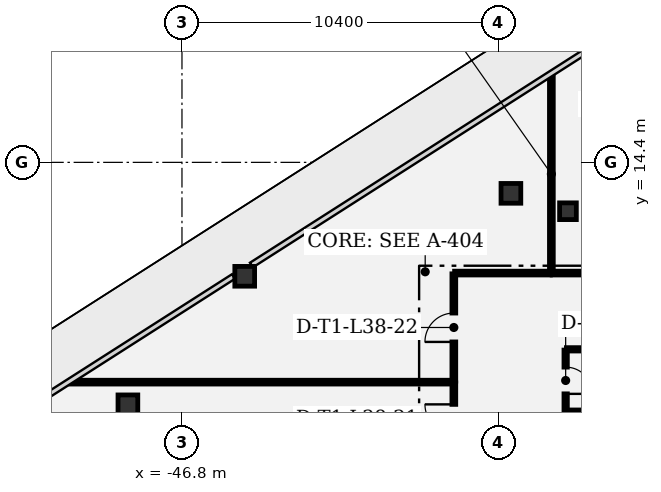
"""IFC4 building model, lengths in metres.
Left out: names, types, materials, properties, quantities, classifications, styles, units other than length and angle.
Written with IfcOpenShell. Run it as: python <this file> out.ifc"""

import sys

from ifc_helpers import new_model, si_unit, direction, frame, frame_2d, origin, origin_2d, place, context, subcontext, project, spatial, rectangle, extrude, element, fill, save


model = new_model("IFC4")
c1 = context("Model", 3, precision=1e-05, world=origin(), true_north=direction((0.0, 1.0)))
c2 = subcontext(c1, "Body", "Model", "MODEL_VIEW")
j1 = project(units=[si_unit("LENGTHUNIT", "METRE"), si_unit("PLANEANGLEUNIT", "RADIAN")], contexts=[c1])
p1 = place(None, origin())
s1 = spatial("IfcSite", under=j1, at=p1, CompositionType="ELEMENT")
p2 = place(p1, origin())
s2 = spatial("IfcBuilding", under=s1, at=p2, CompositionType="ELEMENT")
p3 = place(p2, frame((0.0, 0.0, 166.5)))
s3 = spatial("IfcBuildingStorey", under=s2, at=p3, CompositionType="ELEMENT", Elevation=166.5)
for number, where, z_axis, x_axis in (
    (1, (-44.736, 10.652, 0.0), (0.0, 0.0, 1.0), (1.0, 0.0, 0.0)),
    (2, (-48.578, 6.425, 0.0), (0.0, 0.0, 1.0), (1.0, 0.0, 0.0)),
    (3, (-35.981, 13.381, 0.0), (0.0, 0.0, 1.0), (1.0, 0.0, 0.0)),
):
    element("IfcColumn", number, at=place(p3, frame(where, z_axis=z_axis, x_axis=x_axis)), inside=s3, PredefinedType="COLUMN", context=c2, shape_type="SweptSolid", body=[
        extrude(rectangle(XDim=0.65, YDim=0.65, at=origin_2d()), origin(), (0.0, 0.0, 1.0), 4.05),
    ])
p4 = place(p3, frame((-34.104, 12.792, 0.0), z_axis=(0.0, 0.0, 1.0), x_axis=(1.0, 0.0, 0.0)))
e4 = element("IfcColumn", 4, at=p4, inside=s3, PredefinedType="COLUMN", context=c2, shape_type="SweptSolid", body=[
    extrude(rectangle(XDim=0.55, YDim=0.55, at=origin_2d()), origin(), (0.0, 0.0, 1.0), 4.05),
])
p5 = place(p3, frame((-34.18, 8.225, 0.0), z_axis=(0.0, 0.0, 1.0), x_axis=(0.0, -1.0, 0.0)))
e5 = element("IfcWall", 5, at=p5, inside=s3, PredefinedType="PARTITIONING", context=c2, shape_type="SweptSolid", body=[
    extrude(rectangle(XDim=2.0, YDim=0.11, at=frame_2d((1.0, 0.0))), origin(), (0.0, 0.0, 1.0), 3.78),
])
p6 = place(p5, frame((0.56, 0.0, 0.0)))
e6 = element("IfcOpeningElement", 6, at=p6, cuts=e5, PredefinedType="OPENING", context=c2, shape_type="SweptSolid", body=[
    extrude(rectangle(XDim=0.88, YDim=2.1, at=frame_2d((0.44, 1.05))), frame((0.0, 0.065, 0.0), z_axis=(0.0, -1.0, 0.0), x_axis=(1.0, 0.0, 0.0)), (0.0, 0.0, 1.0), 0.13),
])
p7 = place(p3, frame((-34.155, 6.2, 0.0), z_axis=(0.0, 0.0, 1.0), x_axis=(1.0, 0.0, 0.0)))
e7 = element("IfcWall", 7, at=p7, inside=s3, PredefinedType="PARTITIONING", context=c2, shape_type="SweptSolid", body=[
    extrude(rectangle(XDim=3.25, YDim=0.11, at=frame_2d((1.625, 0.0))), origin(), (0.0, 0.0, 1.0), 3.344),
])
p8 = place(p3, frame((-30.905, 8.25, 0.0), z_axis=(0.0, 0.0, 1.0), x_axis=(-1.0, 0.0, 0.0)))
e8 = element("IfcWall", 8, at=p8, inside=s3, PredefinedType="PARTITIONING", context=c2, shape_type="SweptSolid", body=[
    extrude(rectangle(XDim=3.25, YDim=0.11, at=frame_2d((1.625, 0.0))), origin(), (0.0, 0.0, 1.0), 3.78),
])
p9 = place(p3, frame((-34.65, 17.248, 0.0), z_axis=(0.0, 0.0, 1.0), x_axis=(0.0, -1.0, 0.0)))
e9 = element("IfcWall", 9, at=p9, inside=s3, PredefinedType="PARTITIONING", context=c2, shape_type="SweptSolid", body=[
    extrude(rectangle(XDim=6.465, YDim=0.125, at=frame_2d((3.232, 0.0))), origin(), (0.0, 0.0, 1.0), 3.78),
])
p10 = place(p3, frame((-34.625, 10.758, 0.0), z_axis=(0.0, 0.0, 1.0), x_axis=(1.0, 0.0, 0.0)))
e10 = element("IfcWall", 10, at=p10, inside=s3, PredefinedType="PARTITIONING", context=c2, shape_type="SweptSolid", body=[
    extrude(rectangle(XDim=4.621, YDim=0.125, at=frame_2d((2.311, 0.0))), origin(), (0.0, 0.0, 1.0), 3.344),
])
p11 = place(p10, frame((1.835, 0.0, 0.0)))
e11 = element("IfcOpeningElement", 11, at=p11, cuts=e10, PredefinedType="OPENING", context=c2, shape_type="SweptSolid", body=[
    extrude(rectangle(XDim=0.95, YDim=2.15, at=frame_2d((0.475, 1.075))), frame((0.0, 0.073, 0.0), z_axis=(0.0, -1.0, 0.0), x_axis=(1.0, 0.0, 0.0)), (0.0, 0.0, 1.0), 0.145),
])
p12 = place(p3, frame((-37.858, 4.783, 0.0), z_axis=(0.0, 0.0, 1.0), x_axis=(0.0, 1.0, 0.0)))
e12 = element("IfcWall", 12, at=p12, inside=s3, PredefinedType="PARTITIONING", context=c2, shape_type="SweptSolid", body=[
    extrude(rectangle(XDim=2.362, YDim=0.125, at=frame_2d((1.181, 0.0))), origin(), (0.0, 0.0, 1.0), 3.78),
])
p13 = place(p12, frame((0.706, 0.0, 0.0)))
e13 = element("IfcOpeningElement", 13, at=p13, cuts=e12, PredefinedType="OPENING", context=c2, shape_type="SweptSolid", body=[
    extrude(rectangle(XDim=0.95, YDim=2.15, at=frame_2d((0.475, 1.075))), frame((0.0, 0.073, 0.0), z_axis=(0.0, -1.0, 0.0), x_axis=(1.0, 0.0, 0.0)), (0.0, 0.0, 1.0), 0.145),
])
p14 = place(p3, frame((-37.883, 7.17, 0.0), z_axis=(0.0, 0.0, 1.0), x_axis=(-1.0, 0.0, 0.0)))
e14 = element("IfcWall", 14, at=p14, inside=s3, PredefinedType="PARTITIONING", context=c2, shape_type="SweptSolid", body=[
    extrude(rectangle(XDim=12.58, YDim=0.125, at=frame_2d((6.29, 0.0))), origin(), (0.0, 0.0, 1.0), 2.9),
])
p15 = place(p3, frame((-37.858, 7.204, 0.0), z_axis=(0.0, 0.0, 1.0), x_axis=(0.0, 1.0, 0.0)))
e15 = element("IfcWall", 15, at=p15, inside=s3, PredefinedType="PARTITIONING", context=c2, shape_type="SweptSolid", body=[
    extrude(rectangle(XDim=3.53, YDim=0.125, at=frame_2d((1.765, 0.0))), origin(), (0.0, 0.0, 1.0), 3.78),
])
p16 = place(p15, frame((1.29, 0.0, 0.0)))
e16 = element("IfcOpeningElement", 16, at=p16, cuts=e15, PredefinedType="OPENING", context=c2, shape_type="SweptSolid", body=[
    extrude(rectangle(XDim=0.95, YDim=2.15, at=frame_2d((0.475, 1.075))), frame((0.0, 0.073, 0.0), z_axis=(0.0, -1.0, 0.0), x_axis=(1.0, 0.0, 0.0)), (0.0, 0.0, 1.0), 0.145),
])
p17 = place(p3, frame((-34.683, 10.758, 0.0), z_axis=(0.0, 0.0, 1.0), x_axis=(-1.0, 0.0, 0.0)))
e17 = element("IfcWall", 17, at=p17, inside=s3, PredefinedType="PARTITIONING", context=c2, shape_type="SweptSolid", body=[
    extrude(rectangle(XDim=3.15, YDim=0.125, at=frame_2d((1.575, 0.0))), origin(), (0.0, 0.0, 1.0), 3.344),
])
p18 = place(p6, origin())
e18 = element("IfcDoor", 18, at=p18, inside=s3, OperationType="SINGLE_SWING_RIGHT", PredefinedType="DOOR", context=c2, shape_type="SweptSolid", body=[
    extrude(rectangle(XDim=0.88, YDim=2.1, at=frame_2d((0.44, 1.05))), frame((0.0, 0.025, 0.0), z_axis=(0.0, -1.0, 0.0), x_axis=(1.0, 0.0, 0.0)), (0.0, 0.0, 1.0), 0.05),
])
fill(e6, e18)
p19 = place(p13, origin())
e19 = element("IfcDoor", 19, at=p19, inside=s3, OperationType="SINGLE_SWING_RIGHT", PredefinedType="DOOR", context=c2, shape_type="SweptSolid", body=[
    extrude(rectangle(XDim=0.95, YDim=2.15, at=frame_2d((0.475, 1.075))), frame((0.0, 0.025, 0.0), z_axis=(0.0, -1.0, 0.0), x_axis=(1.0, 0.0, 0.0)), (0.0, 0.0, 1.0), 0.05),
])
fill(e13, e19)
p20 = place(p16, origin())
e20 = element("IfcDoor", 20, at=p20, inside=s3, OperationType="SINGLE_SWING_LEFT", PredefinedType="DOOR", context=c2, shape_type="SweptSolid", body=[
    extrude(rectangle(XDim=0.95, YDim=2.15, at=frame_2d((0.475, 1.075))), frame((0.0, 0.025, 0.0), z_axis=(0.0, -1.0, 0.0), x_axis=(1.0, 0.0, 0.0)), (0.0, 0.0, 1.0), 0.05),
])
fill(e16, e20)
save(model, sys.argv[1])
